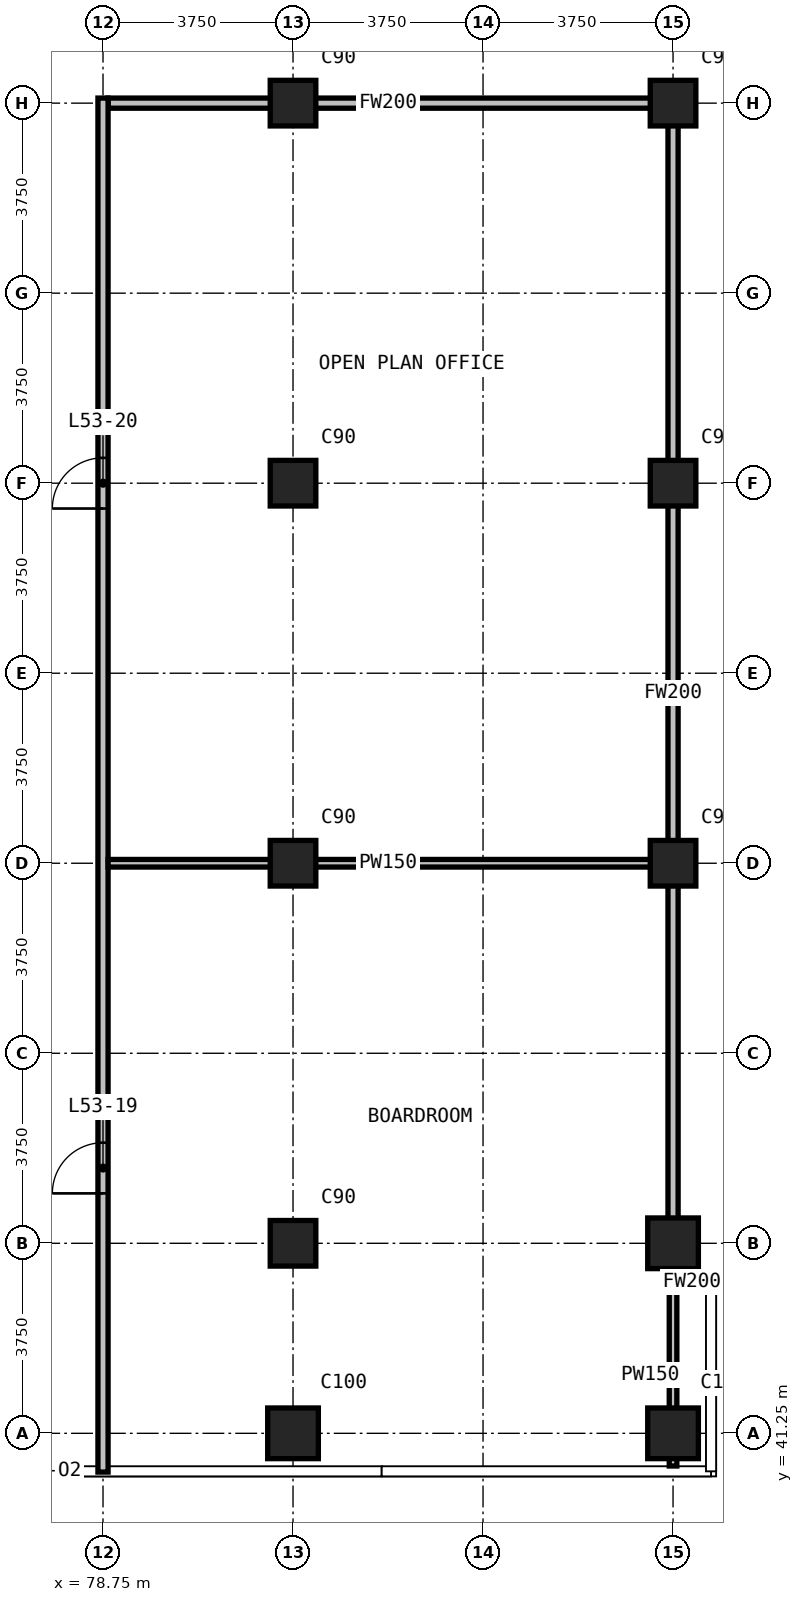
"""IFC4 building model, lengths in metres.
Left out: names, types, materials, properties, quantities, classifications, styles, units other than length and angle.
Written with IfcOpenShell. Run it as: python <this file> out.ifc"""

import sys

from ifc_helpers import new_model, si_unit, direction, frame, frame_2d, origin, origin_2d, place, context, subcontext, project, spatial, rectangle, extrude, element, fill, save


model = new_model("IFC4")
c1 = context("Model", 3, precision=1e-05, world=origin(), true_north=direction((0.0, 1.0)))
c2 = subcontext(c1, "Body", "Model", "MODEL_VIEW")
j1 = project(units=[si_unit("LENGTHUNIT", "METRE"), si_unit("PLANEANGLEUNIT", "RADIAN")], contexts=[c1])
p1 = place(None, origin())
s1 = spatial("IfcSite", under=j1, at=p1, CompositionType="ELEMENT")
p2 = place(p1, origin())
s2 = spatial("IfcBuilding", under=s1, at=p2, CompositionType="ELEMENT")
p3 = place(p2, frame((0.0, 0.0, 206.7)))
s3 = spatial("IfcBuildingStorey", under=s2, at=p3, CompositionType="ELEMENT", Elevation=206.7)
p4 = place(p3, frame((82.5, 41.25, 0.0), z_axis=(0.0, 0.0, 1.0), x_axis=(1.0, 0.0, 0.0)))
e1 = element("IfcColumn", 1, at=p4, inside=s3, PredefinedType="COLUMN", context=c2, shape_type="SweptSolid", body=[
    extrude(rectangle(XDim=1.0, YDim=1.0, at=origin_2d()), origin(), (0.0, 0.0, 1.0), 3.6),
])
for number, where, z_axis, x_axis in (
    (2, (82.5, 45.0, 0.0), (0.0, 0.0, 1.0), (1.0, 0.0, 0.0)),
    (3, (82.5, 52.5, 0.0), (0.0, 0.0, 1.0), (1.0, 0.0, 0.0)),
    (4, (82.5, 60.0, 0.0), (0.0, 0.0, 1.0), (1.0, 0.0, 0.0)),
    (5, (82.5, 67.5, 0.0), (0.0, 0.0, 1.0), (1.0, 0.0, 0.0)),
):
    element("IfcColumn", number, at=place(p3, frame(where, z_axis=z_axis, x_axis=x_axis)), inside=s3, PredefinedType="COLUMN", context=c2, shape_type="SweptSolid", body=[
        extrude(rectangle(XDim=0.9, YDim=0.9, at=origin_2d()), origin(), (0.0, 0.0, 1.0), 3.6),
    ])
for number, where, z_axis, x_axis in (
    (6, (90.0, 41.25, 0.0), (0.0, 0.0, 1.0), (1.0, 0.0, 0.0)),
    (7, (90.0, 45.0, 0.0), (0.0, 0.0, 1.0), (1.0, 0.0, 0.0)),
):
    element("IfcColumn", number, at=place(p3, frame(where, z_axis=z_axis, x_axis=x_axis)), inside=s3, PredefinedType="COLUMN", context=c2, shape_type="SweptSolid", body=[
        extrude(rectangle(XDim=1.0, YDim=1.0, at=origin_2d()), origin(), (0.0, 0.0, 1.0), 3.6),
    ])
for number, where, z_axis, x_axis in (
    (8, (90.0, 52.5, 0.0), (0.0, 0.0, 1.0), (1.0, 0.0, 0.0)),
    (9, (90.0, 60.0, 0.0), (0.0, 0.0, 1.0), (1.0, 0.0, 0.0)),
    (10, (90.0, 67.5, 0.0), (0.0, 0.0, 1.0), (1.0, 0.0, 0.0)),
):
    element("IfcColumn", number, at=place(p3, frame(where, z_axis=z_axis, x_axis=x_axis)), inside=s3, PredefinedType="COLUMN", context=c2, shape_type="SweptSolid", body=[
        extrude(rectangle(XDim=0.9, YDim=0.9, at=origin_2d()), origin(), (0.0, 0.0, 1.0), 3.6),
    ])
p5 = place(p3, frame((90.1, 44.235, 0.0), z_axis=(0.0, 0.0, 1.0), x_axis=(1.0, 0.0, 0.0)))
e11 = element("IfcWall", 11, at=p5, inside=s3, PredefinedType="PARTITIONING", context=c2, shape_type="SweptSolid", body=[
    extrude(rectangle(XDim=0.545, YDim=0.2, at=frame_2d((0.272, 0.0))), origin(), (0.0, 0.0, 1.0), 3.3),
])
p6 = place(p3, frame((78.85, 67.5, 0.0), z_axis=(0.0, 0.0, 1.0), x_axis=(1.0, 0.0, 0.0)))
e12 = element("IfcWall", 12, at=p6, inside=s3, PredefinedType="PARTITIONING", context=c2, shape_type="SweptSolid", body=[
    extrude(rectangle(XDim=11.05, YDim=0.2, at=frame_2d((5.525, 0.0))), origin(), (0.0, 0.0, 1.0), 3.3),
])
p7 = place(p3, frame((78.75, 40.485, 0.0), z_axis=(0.0, 0.0, 1.0), x_axis=(0.0, 1.0, 0.0)))
e13 = element("IfcWall", 13, at=p7, inside=s3, PredefinedType="PARTITIONING", context=c2, shape_type="SweptSolid", body=[
    extrude(rectangle(XDim=27.115, YDim=0.2, at=frame_2d((13.558, 0.0))), origin(), (0.0, 0.0, 1.0), 3.3),
])
p8 = place(p7, frame((5.5, 0.0, 0.0)))
e14 = element("IfcOpeningElement", 14, at=p8, cuts=e13, PredefinedType="OPENING", context=c2, shape_type="SweptSolid", body=[
    extrude(rectangle(XDim=1.0, YDim=2.2, at=frame_2d((0.5, 1.1))), frame((0.0, 0.11, 0.0), z_axis=(0.0, -1.0, 0.0), x_axis=(1.0, 0.0, 0.0)), (0.0, 0.0, 1.0), 0.22),
])
p9 = place(p7, frame((19.015, 0.0, 0.0)))
e15 = element("IfcOpeningElement", 15, at=p9, cuts=e13, PredefinedType="OPENING", context=c2, shape_type="SweptSolid", body=[
    extrude(rectangle(XDim=1.0, YDim=2.2, at=frame_2d((0.5, 1.1))), frame((0.0, 0.11, 0.0), z_axis=(0.0, -1.0, 0.0), x_axis=(1.0, 0.0, 0.0)), (0.0, 0.0, 1.0), 0.22),
])
p10 = place(p3, frame((90.0, 44.135, 0.0), z_axis=(0.0, 0.0, 1.0), x_axis=(0.0, 1.0, 0.0)))
e16 = element("IfcWall", 16, at=p10, inside=s3, PredefinedType="PARTITIONING", context=c2, shape_type="SweptSolid", body=[
    extrude(rectangle(XDim=23.465, YDim=0.2, at=frame_2d((11.732, 0.0))), origin(), (0.0, 0.0, 1.0), 3.3),
])
p11 = place(p3, frame((78.85, 52.5, 0.0), z_axis=(0.0, 0.0, 1.0), x_axis=(1.0, 0.0, 0.0)))
e17 = element("IfcWall", 17, at=p11, inside=s3, PredefinedType="PARTITIONING", context=c2, shape_type="SweptSolid", body=[
    extrude(rectangle(XDim=11.05, YDim=0.15, at=frame_2d((5.525, 0.0))), origin(), (0.0, 0.0, 1.0), 3.3),
])
p12 = place(p3, frame((90.0, 40.605, 0.0), z_axis=(0.0, 0.0, 1.0), x_axis=(0.0, 1.0, 0.0)))
e18 = element("IfcWall", 18, at=p12, inside=s3, PredefinedType="PARTITIONING", context=c2, shape_type="SweptSolid", body=[
    extrude(rectangle(XDim=3.6, YDim=0.15, at=frame_2d((1.8, 0.0))), origin(), (0.0, 0.0, 1.0), 3.3),
])
p13 = place(p8, origin())
e19 = element("IfcDoor", 19, at=p13, inside=s3, OperationType="SINGLE_SWING_LEFT", PredefinedType="DOOR", context=c2, shape_type="SweptSolid", body=[
    extrude(rectangle(XDim=1.0, YDim=2.2, at=frame_2d((0.5, 1.1))), frame((0.0, 0.025, 0.0), z_axis=(0.0, -1.0, 0.0), x_axis=(1.0, 0.0, 0.0)), (0.0, 0.0, 1.0), 0.05),
])
fill(e14, e19)
p14 = place(p9, origin())
e20 = element("IfcDoor", 20, at=p14, inside=s3, OperationType="SINGLE_SWING_RIGHT", PredefinedType="DOOR", context=c2, shape_type="SweptSolid", body=[
    extrude(rectangle(XDim=1.0, YDim=2.2, at=frame_2d((0.5, 1.1))), frame((0.0, 0.025, 0.0), z_axis=(0.0, -1.0, 0.0), x_axis=(1.0, 0.0, 0.0)), (0.0, 0.0, 1.0), 0.05),
])
fill(e15, e20)
save(model, sys.argv[1])
